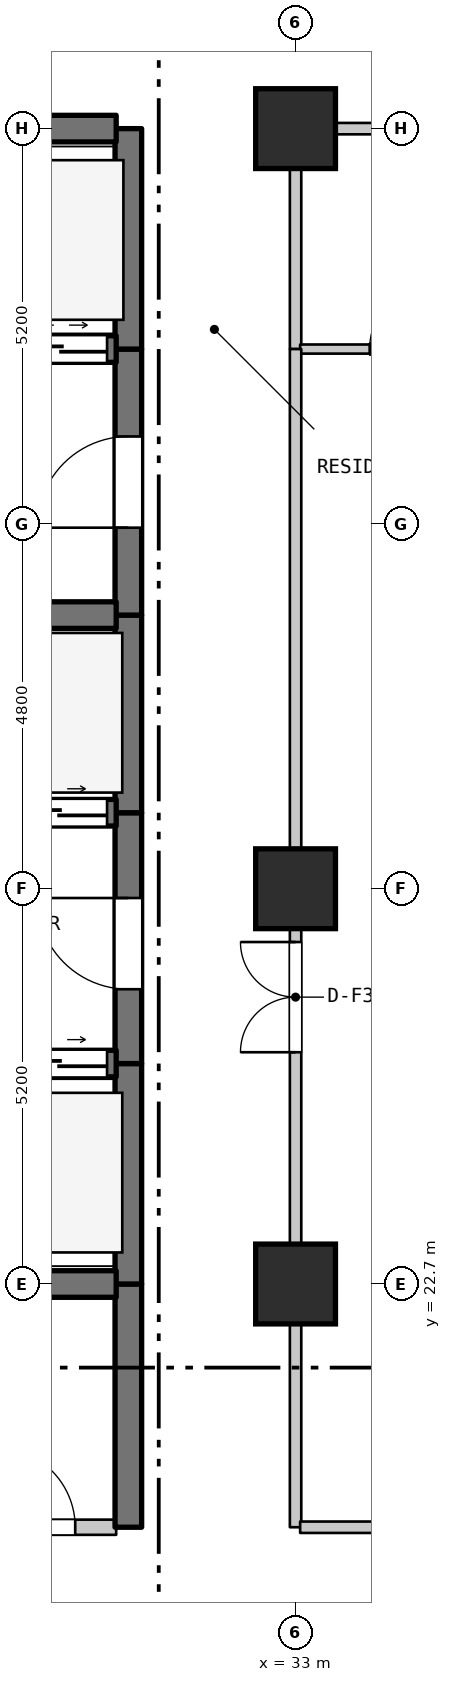
"""IFC4 building model, lengths in metres.
Left out: names, types, materials, properties, quantities, classifications, styles, units other than length and angle.
Written with IfcOpenShell. Run it as: python <this file> out.ifc"""

import sys

from ifc_helpers import new_model, si_unit, direction, frame, frame_2d, origin, origin_2d, place, context, subcontext, project, spatial, rectangle, extrude, element, fill, save


model = new_model("IFC4")
c1 = context("Model", 3, precision=1e-05, world=origin(), true_north=direction((0.0, 1.0)))
c2 = subcontext(c1, "Body", "Model", "MODEL_VIEW")
j1 = project(units=[si_unit("LENGTHUNIT", "METRE"), si_unit("PLANEANGLEUNIT", "RADIAN")], contexts=[c1])
p1 = place(None, origin())
s1 = spatial("IfcSite", under=j1, at=p1, CompositionType="ELEMENT")
p2 = place(p1, origin())
s2 = spatial("IfcBuilding", under=s1, at=p2, CompositionType="ELEMENT")
p3 = place(p2, frame((0.0, 0.0, 120.5)))
s3 = spatial("IfcBuildingStorey", under=s2, at=p3, CompositionType="ELEMENT", Elevation=120.5)
for number, where, z_axis, x_axis in (
    (1, (33.0, 22.7, 0.0), (0.0, 0.0, 1.0), (1.0, 0.0, 0.0)),
    (2, (33.0, 27.9, 0.0), (0.0, 0.0, 1.0), (1.0, 0.0, 0.0)),
    (3, (33.0, 37.9, 0.0), (0.0, 0.0, 1.0), (1.0, 0.0, 0.0)),
):
    element("IfcColumn", number, at=place(p3, frame(where, z_axis=z_axis, x_axis=x_axis)), inside=s3, PredefinedType="COLUMN", context=c2, shape_type="SweptSolid", body=[
        extrude(rectangle(XDim=1.05, YDim=1.05, at=origin_2d()), origin(), (0.0, 0.0, 1.0), 4.8),
    ])
p4 = place(p3, frame((30.8, 19.5, 0.0), z_axis=(0.0, 0.0, 1.0), x_axis=(0.0, 1.0, 0.0)))
e4 = element("IfcWall", 4, at=p4, inside=s3, PredefinedType="SHEAR", context=c2, shape_type="SweptSolid", body=[
    extrude(rectangle(XDim=3.2, YDim=0.35, at=frame_2d((1.6, 0.0))), origin(), (0.0, 0.0, 1.0), 4.48),
])
p5 = place(p3, frame((30.8, 22.7, 0.0), z_axis=(0.0, 0.0, 1.0), x_axis=(0.0, 1.0, 0.0)))
e5 = element("IfcWall", 5, at=p5, inside=s3, PredefinedType="SHEAR", context=c2, shape_type="SweptSolid", body=[
    extrude(rectangle(XDim=2.9, YDim=0.35, at=frame_2d((1.45, 0.0))), origin(), (0.0, 0.0, 1.0), 4.48),
])
p6 = place(p3, frame((30.8, 25.6, 0.0), z_axis=(0.0, 0.0, 1.0), x_axis=(0.0, 1.0, 0.0)))
e6 = element("IfcWall", 6, at=p6, inside=s3, PredefinedType="SHEAR", context=c2, shape_type="SweptSolid", body=[
    extrude(rectangle(XDim=3.3, YDim=0.35, at=frame_2d((1.65, 0.0))), origin(), (0.0, 0.0, 1.0), 4.48),
])
p7 = place(p6, frame((0.978, 0.0, 0.0)))
e7 = element("IfcOpeningElement", 7, at=p7, cuts=e6, PredefinedType="OPENING", context=c2, shape_type="SweptSolid", body=[
    extrude(rectangle(XDim=1.2, YDim=2.2, at=frame_2d((0.6, 1.1))), frame((0.0, 0.185, 0.0), z_axis=(0.0, -1.0, 0.0), x_axis=(1.0, 0.0, 0.0)), (0.0, 0.0, 1.0), 0.37),
])
p8 = place(p3, frame((30.8, 28.9, 0.0), z_axis=(0.0, 0.0, 1.0), x_axis=(0.0, 1.0, 0.0)))
e8 = element("IfcWall", 8, at=p8, inside=s3, PredefinedType="SHEAR", context=c2, shape_type="SweptSolid", body=[
    extrude(rectangle(XDim=2.6, YDim=0.35, at=frame_2d((1.3, 0.0))), origin(), (0.0, 0.0, 1.0), 4.48),
])
p9 = place(p3, frame((30.8, 31.5, 0.0), z_axis=(0.0, 0.0, 1.0), x_axis=(0.0, 1.0, 0.0)))
e9 = element("IfcWall", 9, at=p9, inside=s3, PredefinedType="SHEAR", context=c2, shape_type="SweptSolid", body=[
    extrude(rectangle(XDim=3.5, YDim=0.35, at=frame_2d((1.75, 0.0))), origin(), (0.0, 0.0, 1.0), 4.48),
])
p10 = place(p9, frame((1.15, 0.0, 0.0)))
e10 = element("IfcOpeningElement", 10, at=p10, cuts=e9, PredefinedType="OPENING", context=c2, shape_type="SweptSolid", body=[
    extrude(rectangle(XDim=1.2, YDim=2.2, at=frame_2d((0.6, 1.1))), frame((0.0, 0.185, 0.0), z_axis=(0.0, -1.0, 0.0), x_axis=(1.0, 0.0, 0.0)), (0.0, 0.0, 1.0), 0.37),
])
p11 = place(p3, frame((30.8, 35.0, 0.0), z_axis=(0.0, 0.0, 1.0), x_axis=(0.0, 1.0, 0.0)))
e11 = element("IfcWall", 11, at=p11, inside=s3, PredefinedType="SHEAR", context=c2, shape_type="SweptSolid", body=[
    extrude(rectangle(XDim=2.9, YDim=0.35, at=frame_2d((1.45, 0.0))), origin(), (0.0, 0.0, 1.0), 4.48),
])
p12 = place(p3, frame((33.0, 19.5, 0.0), z_axis=(0.0, 0.0, 1.0), x_axis=(0.0, 1.0, 0.0)))
e12 = element("IfcWall", 12, at=p12, inside=s3, PredefinedType="STANDARD", context=c2, shape_type="SweptSolid", body=[
    extrude(rectangle(XDim=8.4, YDim=0.15, at=frame_2d((4.2, 0.0))), origin(), (0.0, 0.0, 1.0), 4.03),
])
p13 = place(p12, frame((6.249, 0.0, 0.0)))
e13 = element("IfcOpeningElement", 13, at=p13, cuts=e12, PredefinedType="OPENING", context=c2, shape_type="SweptSolid", body=[
    extrude(rectangle(XDim=1.45, YDim=2.2, at=frame_2d((0.725, 1.1))), frame((0.0, 0.085, 0.0), z_axis=(0.0, -1.0, 0.0), x_axis=(1.0, 0.0, 0.0)), (0.0, 0.0, 1.0), 0.17),
])
p14 = place(p3, frame((33.0, 35.0, 0.0), z_axis=(0.0, 0.0, 1.0), x_axis=(0.0, 1.0, 0.0)))
e14 = element("IfcWall", 14, at=p14, inside=s3, PredefinedType="STANDARD", context=c2, shape_type="SweptSolid", body=[
    extrude(rectangle(XDim=2.9, YDim=0.15, at=frame_2d((1.45, 0.0))), origin(), (0.0, 0.0, 1.0), 3.98),
])
p15 = place(p3, frame((28.585, 19.5, 0.0), z_axis=(0.0, 0.0, 1.0), x_axis=(1.0, 0.0, 0.0)))
e15 = element("IfcWall", 15, at=p15, inside=s3, PredefinedType="STANDARD", context=c2, shape_type="SweptSolid", body=[
    extrude(rectangle(XDim=2.055, YDim=0.2, at=frame_2d((1.027, 0.0))), origin(), (0.0, 0.0, 1.0), 4.48),
])
p16 = place(p15, frame((0.466, 0.0, 0.0)))
e16 = element("IfcOpeningElement", 16, at=p16, cuts=e15, PredefinedType="OPENING", context=c2, shape_type="SweptSolid", body=[
    extrude(rectangle(XDim=1.05, YDim=2.15, at=frame_2d((0.525, 1.075))), frame((0.0, 0.11, 0.0), z_axis=(0.0, -1.0, 0.0), x_axis=(1.0, 0.0, 0.0)), (0.0, 0.0, 1.0), 0.22),
])
p17 = place(p3, frame((33.06, 19.5, 0.0), z_axis=(0.0, 0.0, 1.0), x_axis=(1.0, 0.0, 0.0)))
e17 = element("IfcWall", 17, at=p17, inside=s3, PredefinedType="STANDARD", context=c2, shape_type="SweptSolid", body=[
    extrude(rectangle(XDim=21.58, YDim=0.15, at=frame_2d((10.79, 0.0))), origin(), (0.0, 0.0, 1.0), 4.48),
])
p18 = place(p3, frame((28.585, 22.7, 0.0), z_axis=(0.0, 0.0, 1.0), x_axis=(1.0, 0.0, 0.0)))
e18 = element("IfcWall", 18, at=p18, inside=s3, PredefinedType="SHEAR", context=c2, shape_type="SweptSolid", body=[
    extrude(rectangle(XDim=2.055, YDim=0.35, at=frame_2d((1.027, 0.0))), origin(), (0.0, 0.0, 1.0), 4.48),
])
p19 = place(p3, frame((27.46, 25.6, 0.0), z_axis=(0.0, 0.0, 1.0), x_axis=(1.0, 0.0, 0.0)))
e19 = element("IfcWall", 19, at=p19, inside=s3, PredefinedType="SHEAR", context=c2, shape_type="SweptSolid", body=[
    extrude(rectangle(XDim=3.18, YDim=0.35, at=frame_2d((1.59, 0.0))), origin(), (0.0, 0.0, 1.0), 4.48),
])
p20 = place(p19, frame((0.12, 0.0, 0.0)))
e20 = element("IfcOpeningElement", 20, at=p20, cuts=e19, PredefinedType="OPENING", context=c2, shape_type="SweptSolid", body=[
    extrude(rectangle(XDim=1.25, YDim=2.2, at=frame_2d((0.625, 1.1))), frame((0.0, 0.185, 0.0), z_axis=(0.0, -1.0, 0.0), x_axis=(1.0, 0.0, 0.0)), (0.0, 0.0, 1.0), 0.37),
])
p21 = place(p19, frame((1.81, 0.0, 0.0)))
e21 = element("IfcOpeningElement", 21, at=p21, cuts=e19, PredefinedType="OPENING", context=c2, shape_type="SweptSolid", body=[
    extrude(rectangle(XDim=1.25, YDim=2.2, at=frame_2d((0.625, 1.1))), frame((0.0, 0.185, 0.0), z_axis=(0.0, -1.0, 0.0), x_axis=(1.0, 0.0, 0.0)), (0.0, 0.0, 1.0), 0.37),
])
p22 = place(p3, frame((27.46, 28.9, 0.0), z_axis=(0.0, 0.0, 1.0), x_axis=(1.0, 0.0, 0.0)))
e22 = element("IfcWall", 22, at=p22, inside=s3, PredefinedType="SHEAR", context=c2, shape_type="SweptSolid", body=[
    extrude(rectangle(XDim=3.18, YDim=0.35, at=frame_2d((1.59, 0.0))), origin(), (0.0, 0.0, 1.0), 4.48),
])
p23 = place(p22, frame((0.12, 0.0, 0.0)))
e23 = element("IfcOpeningElement", 23, at=p23, cuts=e22, PredefinedType="OPENING", context=c2, shape_type="SweptSolid", body=[
    extrude(rectangle(XDim=1.25, YDim=2.2, at=frame_2d((0.625, 1.1))), frame((0.0, 0.185, 0.0), z_axis=(0.0, -1.0, 0.0), x_axis=(1.0, 0.0, 0.0)), (0.0, 0.0, 1.0), 0.37),
])
p24 = place(p22, frame((1.81, 0.0, 0.0)))
e24 = element("IfcOpeningElement", 24, at=p24, cuts=e22, PredefinedType="OPENING", context=c2, shape_type="SweptSolid", body=[
    extrude(rectangle(XDim=1.25, YDim=2.2, at=frame_2d((0.625, 1.1))), frame((0.0, 0.185, 0.0), z_axis=(0.0, -1.0, 0.0), x_axis=(1.0, 0.0, 0.0)), (0.0, 0.0, 1.0), 0.37),
])
p25 = place(p3, frame((27.46, 31.5, 0.0), z_axis=(0.0, 0.0, 1.0), x_axis=(1.0, 0.0, 0.0)))
e25 = element("IfcWall", 25, at=p25, inside=s3, PredefinedType="SHEAR", context=c2, shape_type="SweptSolid", body=[
    extrude(rectangle(XDim=3.18, YDim=0.35, at=frame_2d((1.59, 0.0))), origin(), (0.0, 0.0, 1.0), 4.48),
])
p26 = place(p3, frame((19.16, 35.0, 0.0), z_axis=(0.0, 0.0, 1.0), x_axis=(1.0, 0.0, 0.0)))
e26 = element("IfcWall", 26, at=p26, inside=s3, PredefinedType="SHEAR", context=c2, shape_type="SweptSolid", body=[
    extrude(rectangle(XDim=11.48, YDim=0.35, at=frame_2d((5.74, 0.0))), origin(), (0.0, 0.0, 1.0), 4.48),
])
p27 = place(p26, frame((0.365, 0.0, 0.0)))
e27 = element("IfcOpeningElement", 27, at=p27, cuts=e26, PredefinedType="OPENING", context=c2, shape_type="SweptSolid", body=[
    extrude(rectangle(XDim=1.35, YDim=2.2, at=frame_2d((0.675, 1.1))), frame((0.0, 0.185, 0.0), z_axis=(0.0, -1.0, 0.0), x_axis=(1.0, 0.0, 0.0)), (0.0, 0.0, 1.0), 0.37),
])
p28 = place(p26, frame((2.765, 0.0, 0.0)))
e28 = element("IfcOpeningElement", 28, at=p28, cuts=e26, PredefinedType="OPENING", context=c2, shape_type="SweptSolid", body=[
    extrude(rectangle(XDim=1.35, YDim=2.2, at=frame_2d((0.675, 1.1))), frame((0.0, 0.185, 0.0), z_axis=(0.0, -1.0, 0.0), x_axis=(1.0, 0.0, 0.0)), (0.0, 0.0, 1.0), 0.37),
])
p29 = place(p26, frame((4.915, 0.0, 0.0)))
e29 = element("IfcOpeningElement", 29, at=p29, cuts=e26, PredefinedType="OPENING", context=c2, shape_type="SweptSolid", body=[
    extrude(rectangle(XDim=1.2, YDim=2.2, at=frame_2d((0.6, 1.1))), frame((0.0, 0.185, 0.0), z_axis=(0.0, -1.0, 0.0), x_axis=(1.0, 0.0, 0.0)), (0.0, 0.0, 1.0), 0.37),
])
p30 = place(p26, frame((6.665, 0.0, 0.0)))
e30 = element("IfcOpeningElement", 30, at=p30, cuts=e26, PredefinedType="OPENING", context=c2, shape_type="SweptSolid", body=[
    extrude(rectangle(XDim=1.2, YDim=2.2, at=frame_2d((0.6, 1.1))), frame((0.0, 0.185, 0.0), z_axis=(0.0, -1.0, 0.0), x_axis=(1.0, 0.0, 0.0)), (0.0, 0.0, 1.0), 0.37),
])
p31 = place(p26, frame((8.415, 0.0, 0.0)))
e31 = element("IfcOpeningElement", 31, at=p31, cuts=e26, PredefinedType="OPENING", context=c2, shape_type="SweptSolid", body=[
    extrude(rectangle(XDim=1.2, YDim=2.2, at=frame_2d((0.6, 1.1))), frame((0.0, 0.185, 0.0), z_axis=(0.0, -1.0, 0.0), x_axis=(1.0, 0.0, 0.0)), (0.0, 0.0, 1.0), 0.37),
])
p32 = place(p26, frame((10.16, 0.0, 0.0)))
e32 = element("IfcOpeningElement", 32, at=p32, cuts=e26, PredefinedType="OPENING", context=c2, shape_type="SweptSolid", body=[
    extrude(rectangle(XDim=1.2, YDim=2.2, at=frame_2d((0.6, 1.1))), frame((0.0, 0.185, 0.0), z_axis=(0.0, -1.0, 0.0), x_axis=(1.0, 0.0, 0.0)), (0.0, 0.0, 1.0), 0.37),
])
p33 = place(p3, frame((33.06, 35.0, 0.0), z_axis=(0.0, 0.0, 1.0), x_axis=(1.0, 0.0, 0.0)))
e33 = element("IfcWall", 33, at=p33, inside=s3, PredefinedType="PARTITIONING", context=c2, shape_type="SweptSolid", body=[
    extrude(rectangle(XDim=5.595, YDim=0.12, at=frame_2d((2.797, 0.0))), origin(), (0.0, 0.0, 1.0), 4.48),
])
p34 = place(p33, frame((0.915, 0.0, 0.0)))
e34 = element("IfcOpeningElement", 34, at=p34, cuts=e33, PredefinedType="OPENING", context=c2, shape_type="SweptSolid", body=[
    extrude(rectangle(XDim=0.9, YDim=2.1, at=frame_2d((0.45, 1.05))), frame((0.0, 0.07, 0.0), z_axis=(0.0, -1.0, 0.0), x_axis=(1.0, 0.0, 0.0)), (0.0, 0.0, 1.0), 0.14),
])
p35 = place(p33, frame((3.615, 0.0, 0.0)))
e35 = element("IfcOpeningElement", 35, at=p35, cuts=e33, PredefinedType="OPENING", context=c2, shape_type="SweptSolid", body=[
    extrude(rectangle(XDim=0.9, YDim=2.1, at=frame_2d((0.45, 1.05))), frame((0.0, 0.07, 0.0), z_axis=(0.0, -1.0, 0.0), x_axis=(1.0, 0.0, 0.0)), (0.0, 0.0, 1.0), 0.14),
])
p36 = place(p3, frame((19.16, 37.9, 0.0), z_axis=(0.0, 0.0, 1.0), x_axis=(1.0, 0.0, 0.0)))
e36 = element("IfcWall", 36, at=p36, inside=s3, PredefinedType="SHEAR", context=c2, shape_type="SweptSolid", body=[
    extrude(rectangle(XDim=11.48, YDim=0.35, at=frame_2d((5.74, 0.0))), origin(), (0.0, 0.0, 1.0), 4.48),
])
p37 = place(p3, frame((33.06, 37.9, 0.0), z_axis=(0.0, 0.0, 1.0), x_axis=(1.0, 0.0, 0.0)))
e37 = element("IfcWall", 37, at=p37, inside=s3, PredefinedType="STANDARD", context=c2, shape_type="SweptSolid", body=[
    extrude(rectangle(XDim=5.595, YDim=0.15, at=frame_2d((2.797, 0.0))), origin(), (0.0, 0.0, 1.0), 4.48),
])
p38 = place(p3, frame((33.0, 27.9, 0.0), z_axis=(0.0, 0.0, 1.0), x_axis=(0.0, 1.0, 0.0)))
e38 = element("IfcWall", 38, at=p38, inside=s3, PredefinedType="STANDARD", context=c2, shape_type="SweptSolid", body=[
    extrude(rectangle(XDim=7.1, YDim=0.15, at=frame_2d((3.55, 0.0))), origin(), (0.0, 0.0, 1.0), 3.98),
])
p39 = place(p7, origin())
e39 = element("IfcDoor", 39, at=p39, inside=s3, OperationType="SINGLE_SWING_RIGHT", PredefinedType="DOOR", context=c2, shape_type="SweptSolid", body=[
    extrude(rectangle(XDim=1.2, YDim=2.2, at=frame_2d((0.6, 1.1))), frame((0.0, 0.025, 0.0), z_axis=(0.0, -1.0, 0.0), x_axis=(1.0, 0.0, 0.0)), (0.0, 0.0, 1.0), 0.05),
])
fill(e7, e39)
p40 = place(p10, origin())
e40 = element("IfcDoor", 40, at=p40, inside=s3, OperationType="SINGLE_SWING_LEFT", PredefinedType="DOOR", context=c2, shape_type="SweptSolid", body=[
    extrude(rectangle(XDim=1.2, YDim=2.2, at=frame_2d((0.6, 1.1))), frame((0.0, 0.025, 0.0), z_axis=(0.0, -1.0, 0.0), x_axis=(1.0, 0.0, 0.0)), (0.0, 0.0, 1.0), 0.05),
])
fill(e10, e40)
p41 = place(p13, origin())
e41 = element("IfcDoor", 41, at=p41, inside=s3, OperationType="DOUBLE_DOOR_SINGLE_SWING", PredefinedType="DOOR", context=c2, shape_type="SweptSolid", body=[
    extrude(rectangle(XDim=1.45, YDim=2.2, at=frame_2d((0.725, 1.1))), frame((0.0, 0.025, 0.0), z_axis=(0.0, -1.0, 0.0), x_axis=(1.0, 0.0, 0.0)), (0.0, 0.0, 1.0), 0.05),
])
fill(e13, e41)
p42 = place(p16, origin())
e42 = element("IfcDoor", 42, at=p42, inside=s3, OperationType="SINGLE_SWING_LEFT", PredefinedType="DOOR", context=c2, shape_type="SweptSolid", body=[
    extrude(rectangle(XDim=1.05, YDim=2.15, at=frame_2d((0.525, 1.075))), frame((0.0, 0.025, 0.0), z_axis=(0.0, -1.0, 0.0), x_axis=(1.0, 0.0, 0.0)), (0.0, 0.0, 1.0), 0.05),
])
fill(e16, e42)
p43 = place(p21, origin())
e43 = element("IfcDoor", 43, at=p43, inside=s3, OperationType="DOUBLE_DOOR_SLIDING", PredefinedType="DOOR", context=c2, shape_type="SweptSolid", body=[
    extrude(rectangle(XDim=1.25, YDim=2.2, at=frame_2d((0.625, 1.1))), frame((0.0, 0.025, 0.0), z_axis=(0.0, -1.0, 0.0), x_axis=(1.0, 0.0, 0.0)), (0.0, 0.0, 1.0), 0.05),
])
fill(e21, e43)
p44 = place(p24, origin())
e44 = element("IfcDoor", 44, at=p44, inside=s3, OperationType="DOUBLE_DOOR_SLIDING", PredefinedType="DOOR", context=c2, shape_type="SweptSolid", body=[
    extrude(rectangle(XDim=1.25, YDim=2.2, at=frame_2d((0.625, 1.1))), frame((0.0, 0.025, 0.0), z_axis=(0.0, -1.0, 0.0), x_axis=(1.0, 0.0, 0.0)), (0.0, 0.0, 1.0), 0.05),
])
fill(e24, e44)
p45 = place(p32, origin())
e45 = element("IfcDoor", 45, at=p45, inside=s3, OperationType="DOUBLE_DOOR_SLIDING", PredefinedType="DOOR", context=c2, shape_type="SweptSolid", body=[
    extrude(rectangle(XDim=1.2, YDim=2.2, at=frame_2d((0.6, 1.1))), frame((0.0, 0.025, 0.0), z_axis=(0.0, -1.0, 0.0), x_axis=(1.0, 0.0, 0.0)), (0.0, 0.0, 1.0), 0.05),
])
fill(e32, e45)
p46 = place(p34, origin())
e46 = element("IfcDoor", 46, at=p46, inside=s3, OperationType="SINGLE_SWING_RIGHT", PredefinedType="DOOR", context=c2, shape_type="SweptSolid", body=[
    extrude(rectangle(XDim=0.9, YDim=2.1, at=frame_2d((0.45, 1.05))), frame((0.0, 0.025, 0.0), z_axis=(0.0, -1.0, 0.0), x_axis=(1.0, 0.0, 0.0)), (0.0, 0.0, 1.0), 0.05),
])
fill(e34, e46)
save(model, sys.argv[1])
